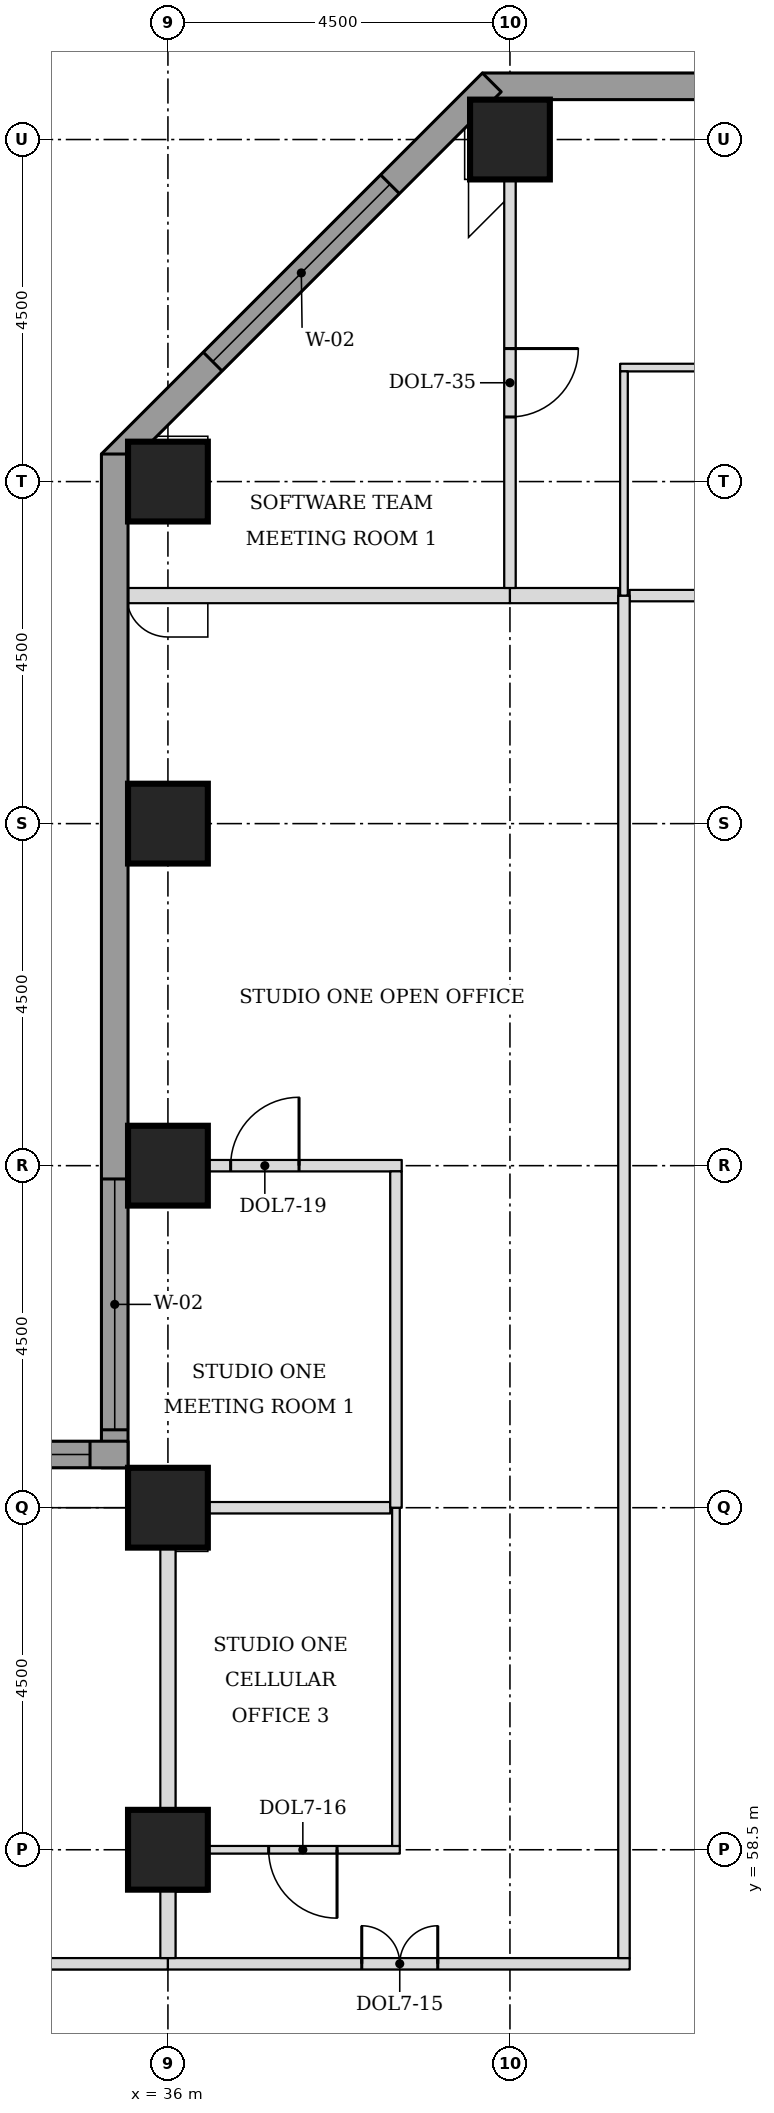
"""IFC4 building model, lengths in metres.
Left out: names, types, materials, properties, quantities, classifications, styles, units other than length and angle.
Written with IfcOpenShell. Run it as: python <this file> out.ifc"""

import sys

from ifc_helpers import new_model, si_unit, direction, frame, frame_2d, origin, origin_2d, place, context, subcontext, project, spatial, rectangle, extrude, element, fill, save


model = new_model("IFC4")
c1 = context("Model", 3, precision=1e-05, world=origin(), true_north=direction((0.0, 1.0)))
c2 = subcontext(c1, "Body", "Model", "MODEL_VIEW")
j1 = project(units=[si_unit("LENGTHUNIT", "METRE"), si_unit("PLANEANGLEUNIT", "RADIAN")], contexts=[c1])
p1 = place(None, origin())
s1 = spatial("IfcSite", under=j1, at=p1, CompositionType="ELEMENT")
p2 = place(p1, origin())
s2 = spatial("IfcBuilding", under=s1, at=p2, CompositionType="ELEMENT")
p3 = place(p2, frame((0.0, 0.0, 130.7)))
s3 = spatial("IfcBuildingStorey", under=s2, at=p3, CompositionType="ELEMENT", Elevation=130.7)
for number, where, z_axis, x_axis in (
    (1, (36.0, 58.5, 0.0), (0.0, 0.0, 1.0), (1.0, 0.0, 0.0)),
    (2, (36.0, 63.0, 0.0), (0.0, 0.0, 1.0), (1.0, 0.0, 0.0)),
    (3, (36.0, 67.5, 0.0), (0.0, 0.0, 1.0), (1.0, 0.0, 0.0)),
    (4, (36.0, 72.0, 0.0), (0.0, 0.0, 1.0), (1.0, 0.0, 0.0)),
    (5, (36.0, 76.5, 0.0), (0.0, 0.0, 1.0), (1.0, 0.0, 0.0)),
    (6, (40.5, 81.0, 0.0), (0.0, 0.0, 1.0), (1.0, 0.0, 0.0)),
):
    element("IfcColumn", number, at=place(p3, frame(where, z_axis=z_axis, x_axis=x_axis)), inside=s3, PredefinedType="COLUMN", context=c2, shape_type="SweptSolid", body=[
        extrude(rectangle(XDim=1.05, YDim=1.05, at=origin_2d()), origin(), (0.0, 0.0, 1.0), 3.7),
    ])
p4 = place(p3, frame((72.362, 81.7, 0.0), z_axis=(0.0, 0.0, 1.0), x_axis=(-1.0, 0.0, 0.0)))
e7 = element("IfcWall", 7, at=p4, inside=s3, PredefinedType="STANDARD", context=c2, shape_type="SweptSolid", body=[
    extrude(rectangle(XDim=32.225, YDim=0.35, at=frame_2d((16.112, 0.0))), origin(), (0.0, 0.0, 1.0), 3.525),
])
p5 = place(p4, frame((5.462, 0.0, 0.9)))
e8 = element("IfcOpeningElement", 8, at=p5, cuts=e7, PredefinedType="OPENING", context=c2, shape_type="SweptSolid", body=[
    extrude(rectangle(XDim=3.3, YDim=1.9, at=frame_2d((1.65, 0.95))), frame((0.0, 0.185, 0.0), z_axis=(0.0, -1.0, 0.0), x_axis=(1.0, 0.0, 0.0)), (0.0, 0.0, 1.0), 0.37),
])
p6 = place(p4, frame((9.962, 0.0, 0.9)))
e9 = element("IfcOpeningElement", 9, at=p6, cuts=e7, PredefinedType="OPENING", context=c2, shape_type="SweptSolid", body=[
    extrude(rectangle(XDim=3.3, YDim=1.9, at=frame_2d((1.65, 0.95))), frame((0.0, 0.185, 0.0), z_axis=(0.0, -1.0, 0.0), x_axis=(1.0, 0.0, 0.0)), (0.0, 0.0, 1.0), 0.37),
])
p7 = place(p4, frame((14.462, 0.0, 0.9)))
e10 = element("IfcOpeningElement", 10, at=p7, cuts=e7, PredefinedType="OPENING", context=c2, shape_type="SweptSolid", body=[
    extrude(rectangle(XDim=3.3, YDim=1.9, at=frame_2d((1.65, 0.95))), frame((0.0, 0.185, 0.0), z_axis=(0.0, -1.0, 0.0), x_axis=(1.0, 0.0, 0.0)), (0.0, 0.0, 1.0), 0.37),
])
p8 = place(p4, frame((18.962, 0.0, 0.9)))
e11 = element("IfcOpeningElement", 11, at=p8, cuts=e7, PredefinedType="OPENING", context=c2, shape_type="SweptSolid", body=[
    extrude(rectangle(XDim=3.3, YDim=1.9, at=frame_2d((1.65, 0.95))), frame((0.0, 0.185, 0.0), z_axis=(0.0, -1.0, 0.0), x_axis=(1.0, 0.0, 0.0)), (0.0, 0.0, 1.0), 0.37),
])
p9 = place(p4, frame((23.462, 0.0, 0.9)))
e12 = element("IfcOpeningElement", 12, at=p9, cuts=e7, PredefinedType="OPENING", context=c2, shape_type="SweptSolid", body=[
    extrude(rectangle(XDim=3.3, YDim=1.9, at=frame_2d((1.65, 0.95))), frame((0.0, 0.185, 0.0), z_axis=(0.0, -1.0, 0.0), x_axis=(1.0, 0.0, 0.0)), (0.0, 0.0, 1.0), 0.37),
])
p10 = place(p3, frame((40.261, 81.751, 0.0), z_axis=(0.0, 0.0, 1.0), x_axis=(-0.707106781187, -0.707106781187, 0.0)))
e13 = element("IfcWall", 13, at=p10, inside=s3, PredefinedType="STANDARD", context=c2, shape_type="SweptSolid", body=[
    extrude(rectangle(XDim=7.089, YDim=0.35, at=frame_2d((3.544, 0.0))), origin(), (0.0, 0.0, 1.0), 3.525),
])
p11 = place(p10, frame((1.894, 0.0, 0.9)))
e14 = element("IfcOpeningElement", 14, at=p11, cuts=e13, PredefinedType="OPENING", context=c2, shape_type="SweptSolid", body=[
    extrude(rectangle(XDim=3.3, YDim=1.9, at=frame_2d((1.65, 0.95))), frame((0.0, 0.185, 0.0), z_axis=(0.0, -1.0, 0.0), x_axis=(1.0, 0.0, 0.0)), (0.0, 0.0, 1.0), 0.37),
])
p12 = place(p3, frame((35.3, 76.862, 0.0), z_axis=(0.0, 0.0, 1.0), x_axis=(0.0, -1.0, 0.0)))
e15 = element("IfcWall", 15, at=p12, inside=s3, PredefinedType="STANDARD", context=c2, shape_type="SweptSolid", body=[
    extrude(rectangle(XDim=13.337, YDim=0.35, at=frame_2d((6.669, 0.0))), origin(), (0.0, 0.0, 1.0), 3.525),
])
p13 = place(p12, frame((9.537, 0.0, 0.9)))
e16 = element("IfcOpeningElement", 16, at=p13, cuts=e15, PredefinedType="OPENING", context=c2, shape_type="SweptSolid", body=[
    extrude(rectangle(XDim=3.3, YDim=1.9, at=frame_2d((1.65, 0.95))), frame((0.0, 0.185, 0.0), z_axis=(0.0, -1.0, 0.0), x_axis=(1.0, 0.0, 0.0)), (0.0, 0.0, 1.0), 0.37),
])
p14 = place(p3, frame((35.475, 63.7, 0.0), z_axis=(0.0, 0.0, 1.0), x_axis=(-1.0, 0.0, 0.0)))
e17 = element("IfcWall", 17, at=p14, inside=s3, PredefinedType="STANDARD", context=c2, shape_type="SweptSolid", body=[
    extrude(rectangle(XDim=17.837, YDim=0.35, at=frame_2d((8.919, 0.0))), origin(), (0.0, 0.0, 1.0), 3.525),
])
p15 = place(p14, frame((0.5, 0.0, 0.9)))
e18 = element("IfcOpeningElement", 18, at=p15, cuts=e17, PredefinedType="OPENING", context=c2, shape_type="SweptSolid", body=[
    extrude(rectangle(XDim=3.3, YDim=1.9, at=frame_2d((1.65, 0.95))), frame((0.0, 0.185, 0.0), z_axis=(0.0, -1.0, 0.0), x_axis=(1.0, 0.0, 0.0)), (0.0, 0.0, 1.0), 0.37),
])
p16 = place(p14, frame((9.075, 0.0, 0.9)))
e19 = element("IfcOpeningElement", 19, at=p16, cuts=e17, PredefinedType="OPENING", context=c2, shape_type="SweptSolid", body=[
    extrude(rectangle(XDim=3.3, YDim=1.9, at=frame_2d((1.65, 0.95))), frame((0.0, 0.185, 0.0), z_axis=(0.0, -1.0, 0.0), x_axis=(1.0, 0.0, 0.0)), (0.0, 0.0, 1.0), 0.37),
])
p17 = place(p3, frame((29.38, 57.0, 0.0), z_axis=(0.0, 0.0, 1.0), x_axis=(1.0, 0.0, 0.0)))
e20 = element("IfcWall", 20, at=p17, inside=s3, PredefinedType="PARTITIONING", context=c2, shape_type="SweptSolid", body=[
    extrude(rectangle(XDim=6.62, YDim=0.15, at=frame_2d((3.31, 0.0))), origin(), (0.0, 0.0, 1.0), 3.55),
])
p18 = place(p17, frame((2.88, 0.0, 0.0)))
e21 = element("IfcOpeningElement", 21, at=p18, cuts=e20, PredefinedType="OPENING", context=c2, shape_type="SweptSolid", body=[
    extrude(rectangle(XDim=1.0, YDim=2.1, at=frame_2d((0.5, 1.05))), frame((0.0, 0.085, 0.0), z_axis=(0.0, -1.0, 0.0), x_axis=(1.0, 0.0, 0.0)), (0.0, 0.0, 1.0), 0.17),
])
p19 = place(p3, frame((36.0, 57.0, 0.0), z_axis=(0.0, 0.0, 1.0), x_axis=(1.0, 0.0, 0.0)))
e22 = element("IfcWall", 22, at=p19, inside=s3, PredefinedType="PARTITIONING", context=c2, shape_type="SweptSolid", body=[
    extrude(rectangle(XDim=6.075, YDim=0.15, at=frame_2d((3.038, 0.0))), origin(), (0.0, 0.0, 1.0), 3.55),
])
p20 = place(p19, frame((2.55, 0.0, 0.0)))
e23 = element("IfcOpeningElement", 23, at=p20, cuts=e22, PredefinedType="OPENING", context=c2, shape_type="SweptSolid", body=[
    extrude(rectangle(XDim=1.0, YDim=2.1, at=frame_2d((0.5, 1.05))), frame((0.0, 0.085, 0.0), z_axis=(0.0, -1.0, 0.0), x_axis=(1.0, 0.0, 0.0)), (0.0, 0.0, 1.0), 0.17),
])
p21 = place(p3, frame((36.525, 58.5, 0.0), z_axis=(0.0, 0.0, 1.0), x_axis=(1.0, 0.0, 0.0)))
e24 = element("IfcWall", 24, at=p21, inside=s3, PredefinedType="PARTITIONING", context=c2, shape_type="SweptSolid", body=[
    extrude(rectangle(XDim=2.525, YDim=0.1, at=frame_2d((1.263, 0.0))), origin(), (0.0, 0.0, 1.0), 3.55),
])
p22 = place(p21, frame((0.8, 0.0, 0.0)))
e25 = element("IfcOpeningElement", 25, at=p22, cuts=e24, PredefinedType="OPENING", context=c2, shape_type="SweptSolid", body=[
    extrude(rectangle(XDim=0.9, YDim=2.1, at=frame_2d((0.45, 1.05))), frame((0.0, 0.06, 0.0), z_axis=(0.0, -1.0, 0.0), x_axis=(1.0, 0.0, 0.0)), (0.0, 0.0, 1.0), 0.12),
])
p23 = place(p3, frame((36.525, 63.0, 0.0), z_axis=(0.0, 0.0, 1.0), x_axis=(1.0, 0.0, 0.0)))
e26 = element("IfcWall", 26, at=p23, inside=s3, PredefinedType="PARTITIONING", context=c2, shape_type="SweptSolid", body=[
    extrude(rectangle(XDim=2.4, YDim=0.15, at=frame_2d((1.2, 0.0))), origin(), (0.0, 0.0, 1.0), 3.55),
])
p24 = place(p3, frame((35.475, 67.5, 0.0), z_axis=(0.0, 0.0, 1.0), x_axis=(1.0, 0.0, 0.0)))
e27 = element("IfcWall", 27, at=p24, inside=s3, PredefinedType="PARTITIONING", context=c2, shape_type="SweptSolid", body=[
    extrude(rectangle(XDim=3.6, YDim=0.15, at=frame_2d((1.8, 0.0))), origin(), (0.0, 0.0, 1.0), 3.55),
])
p25 = place(p24, frame((1.35, 0.0, 0.0)))
e28 = element("IfcOpeningElement", 28, at=p25, cuts=e27, PredefinedType="OPENING", context=c2, shape_type="SweptSolid", body=[
    extrude(rectangle(XDim=0.9, YDim=2.1, at=frame_2d((0.45, 1.05))), frame((0.0, 0.085, 0.0), z_axis=(0.0, -1.0, 0.0), x_axis=(1.0, 0.0, 0.0)), (0.0, 0.0, 1.0), 0.17),
])
p26 = place(p3, frame((35.475, 75.0, 0.0), z_axis=(0.0, 0.0, 1.0), x_axis=(1.0, 0.0, 0.0)))
e29 = element("IfcWall", 29, at=p26, inside=s3, PredefinedType="PARTITIONING", context=c2, shape_type="SweptSolid", body=[
    extrude(rectangle(XDim=5.025, YDim=0.2, at=frame_2d((2.512, 0.0))), origin(), (0.0, 0.0, 1.0), 3.55),
])
p27 = place(p3, frame((40.5, 75.0, 0.0), z_axis=(0.0, 0.0, 1.0), x_axis=(1.0, 0.0, 0.0)))
e30 = element("IfcWall", 30, at=p27, inside=s3, PredefinedType="PARTITIONING", context=c2, shape_type="SweptSolid", body=[
    extrude(rectangle(XDim=1.425, YDim=0.2, at=frame_2d((0.712, 0.0))), origin(), (0.0, 0.0, 1.0), 3.55),
])
p28 = place(p3, frame((42.075, 75.0, 0.0), z_axis=(0.0, 0.0, 1.0), x_axis=(1.0, 0.0, 0.0)))
e31 = element("IfcWall", 31, at=p28, inside=s3, PredefinedType="PARTITIONING", context=c2, shape_type="SweptSolid", body=[
    extrude(rectangle(XDim=4.425, YDim=0.15, at=frame_2d((2.212, 0.0))), origin(), (0.0, 0.0, 1.0), 3.55),
])
p29 = place(p28, frame((1.7, 0.0, 0.0)))
e32 = element("IfcOpeningElement", 32, at=p29, cuts=e31, PredefinedType="OPENING", context=c2, shape_type="SweptSolid", body=[
    extrude(rectangle(XDim=1.0, YDim=2.1, at=frame_2d((0.5, 1.05))), frame((0.0, 0.085, 0.0), z_axis=(0.0, -1.0, 0.0), x_axis=(1.0, 0.0, 0.0)), (0.0, 0.0, 1.0), 0.17),
])
p30 = place(p3, frame((41.95, 78.0, 0.0), z_axis=(0.0, 0.0, 1.0), x_axis=(1.0, 0.0, 0.0)))
e33 = element("IfcWall", 33, at=p30, inside=s3, PredefinedType="PARTITIONING", context=c2, shape_type="SweptSolid", body=[
    extrude(rectangle(XDim=4.6, YDim=0.1, at=frame_2d((2.3, 0.0))), origin(), (0.0, 0.0, 1.0), 3.55),
])
p31 = place(p30, frame((1.85, 0.0, 0.0)))
e34 = element("IfcOpeningElement", 34, at=p31, cuts=e33, PredefinedType="OPENING", context=c2, shape_type="SweptSolid", body=[
    extrude(rectangle(XDim=0.9, YDim=2.1, at=frame_2d((0.45, 1.05))), frame((0.0, 0.06, 0.0), z_axis=(0.0, -1.0, 0.0), x_axis=(1.0, 0.0, 0.0)), (0.0, 0.0, 1.0), 0.12),
])
p32 = place(p3, frame((36.0, 57.075, 0.0), z_axis=(0.0, 0.0, 1.0), x_axis=(0.0, 1.0, 0.0)))
e35 = element("IfcWall", 35, at=p32, inside=s3, PredefinedType="PARTITIONING", context=c2, shape_type="SweptSolid", body=[
    extrude(rectangle(XDim=0.9, YDim=0.2, at=frame_2d((0.45, 0.0))), origin(), (0.0, 0.0, 1.0), 2.8),
])
p33 = place(p3, frame((42.0, 57.075, 0.0), z_axis=(0.0, 0.0, 1.0), x_axis=(0.0, 1.0, 0.0)))
e36 = element("IfcWall", 36, at=p33, inside=s3, PredefinedType="PARTITIONING", context=c2, shape_type="SweptSolid", body=[
    extrude(rectangle(XDim=17.925, YDim=0.15, at=frame_2d((8.962, 0.0))), origin(), (0.0, 0.0, 1.0), 3.55),
])
p34 = place(p3, frame((39.0, 58.55, 0.0), z_axis=(0.0, 0.0, 1.0), x_axis=(0.0, 1.0, 0.0)))
e37 = element("IfcWall", 37, at=p34, inside=s3, PredefinedType="PARTITIONING", context=c2, shape_type="SweptSolid", body=[
    extrude(rectangle(XDim=4.45, YDim=0.1, at=frame_2d((2.225, 0.0))), origin(), (0.0, 0.0, 1.0), 3.55),
])
p35 = place(p3, frame((36.0, 58.995, 0.0), z_axis=(0.0, 0.0, 1.0), x_axis=(0.0, 1.0, 0.0)))
e38 = element("IfcWall", 38, at=p35, inside=s3, PredefinedType="PARTITIONING", context=c2, shape_type="SweptSolid", body=[
    extrude(rectangle(XDim=3.48, YDim=0.2, at=frame_2d((1.74, 0.0))), origin(), (0.0, 0.0, 1.0), 2.8),
])
p36 = place(p3, frame((39.0, 63.0, 0.0), z_axis=(0.0, 0.0, 1.0), x_axis=(0.0, 1.0, 0.0)))
e39 = element("IfcWall", 39, at=p36, inside=s3, PredefinedType="PARTITIONING", context=c2, shape_type="SweptSolid", body=[
    extrude(rectangle(XDim=4.425, YDim=0.15, at=frame_2d((2.212, 0.0))), origin(), (0.0, 0.0, 1.0), 3.55),
])
p37 = place(p3, frame((42.0, 75.0, 0.0), z_axis=(0.0, 0.0, 1.0), x_axis=(0.0, 1.0, 0.0)))
e40 = element("IfcWall", 40, at=p37, inside=s3, PredefinedType="PARTITIONING", context=c2, shape_type="SweptSolid", body=[
    extrude(rectangle(XDim=2.95, YDim=0.1, at=frame_2d((1.475, 0.0))), origin(), (0.0, 0.0, 1.0), 3.55),
])
p38 = place(p3, frame((40.5, 75.1, 0.0), z_axis=(0.0, 0.0, 1.0), x_axis=(0.0, 1.0, 0.0)))
e41 = element("IfcWall", 41, at=p38, inside=s3, PredefinedType="PARTITIONING", context=c2, shape_type="SweptSolid", body=[
    extrude(rectangle(XDim=5.375, YDim=0.15, at=frame_2d((2.688, 0.0))), origin(), (0.0, 0.0, 1.0), 3.55),
])
p39 = place(p38, frame((2.25, 0.0, 0.0)))
e42 = element("IfcOpeningElement", 42, at=p39, cuts=e41, PredefinedType="OPENING", context=c2, shape_type="SweptSolid", body=[
    extrude(rectangle(XDim=0.9, YDim=2.1, at=frame_2d((0.45, 1.05))), frame((0.0, 0.085, 0.0), z_axis=(0.0, -1.0, 0.0), x_axis=(1.0, 0.0, 0.0)), (0.0, 0.0, 1.0), 0.17),
])
p40 = place(p11, origin())
e43 = element("IfcWindow", 43, at=p40, inside=s3, PartitioningType="SINGLE_PANEL", PredefinedType="WINDOW", context=c2, shape_type="SweptSolid", body=[
    extrude(rectangle(XDim=3.3, YDim=1.9, at=frame_2d((1.65, 0.95))), frame((0.0, 0.085, 0.0), z_axis=(0.0, -1.0, 0.0), x_axis=(1.0, 0.0, 0.0)), (0.0, 0.0, 1.0), 0.06),
])
fill(e14, e43)
p41 = place(p13, origin())
e44 = element("IfcWindow", 44, at=p41, inside=s3, PartitioningType="SINGLE_PANEL", PredefinedType="WINDOW", context=c2, shape_type="SweptSolid", body=[
    extrude(rectangle(XDim=3.3, YDim=1.9, at=frame_2d((1.65, 0.95))), frame((0.0, 0.085, 0.0), z_axis=(0.0, -1.0, 0.0), x_axis=(1.0, 0.0, 0.0)), (0.0, 0.0, 1.0), 0.06),
])
fill(e16, e44)
p42 = place(p15, origin())
e45 = element("IfcWindow", 45, at=p42, inside=s3, PartitioningType="SINGLE_PANEL", PredefinedType="WINDOW", context=c2, shape_type="SweptSolid", body=[
    extrude(rectangle(XDim=3.3, YDim=1.9, at=frame_2d((1.65, 0.95))), frame((0.0, 0.085, 0.0), z_axis=(0.0, -1.0, 0.0), x_axis=(1.0, 0.0, 0.0)), (0.0, 0.0, 1.0), 0.06),
])
fill(e18, e45)
p43 = place(p39, frame((0.9, 0.0, 0.0), z_axis=(0.0, 0.0, 1.0), x_axis=(-1.0, 0.0, 0.0)))
e46 = element("IfcDoor", 46, at=p43, inside=s3, OperationType="SINGLE_SWING_LEFT", PredefinedType="DOOR", context=c2, shape_type="SweptSolid", body=[
    extrude(rectangle(XDim=0.9, YDim=2.1, at=frame_2d((0.45, 1.05))), frame((0.0, 0.025, 0.0), z_axis=(0.0, -1.0, 0.0), x_axis=(1.0, 0.0, 0.0)), (0.0, 0.0, 1.0), 0.05),
])
fill(e42, e46)
p44 = place(p20, origin())
e47 = element("IfcDoor", 47, at=p44, inside=s3, OperationType="DOUBLE_DOOR_SINGLE_SWING", PredefinedType="DOOR", context=c2, shape_type="SweptSolid", body=[
    extrude(rectangle(XDim=1.0, YDim=2.1, at=frame_2d((0.5, 1.05))), frame((0.0, 0.025, 0.0), z_axis=(0.0, -1.0, 0.0), x_axis=(1.0, 0.0, 0.0)), (0.0, 0.0, 1.0), 0.05),
])
fill(e23, e47)
p45 = place(p22, frame((0.9, 0.0, 0.0), z_axis=(0.0, 0.0, 1.0), x_axis=(-1.0, 0.0, 0.0)))
e48 = element("IfcDoor", 48, at=p45, inside=s3, OperationType="SINGLE_SWING_LEFT", PredefinedType="DOOR", context=c2, shape_type="SweptSolid", body=[
    extrude(rectangle(XDim=0.9, YDim=2.1, at=frame_2d((0.45, 1.05))), frame((0.0, 0.025, 0.0), z_axis=(0.0, -1.0, 0.0), x_axis=(1.0, 0.0, 0.0)), (0.0, 0.0, 1.0), 0.05),
])
fill(e25, e48)
p46 = place(p25, origin())
e49 = element("IfcDoor", 49, at=p46, inside=s3, OperationType="SINGLE_SWING_RIGHT", PredefinedType="DOOR", context=c2, shape_type="SweptSolid", body=[
    extrude(rectangle(XDim=0.9, YDim=2.1, at=frame_2d((0.45, 1.05))), frame((0.0, 0.025, 0.0), z_axis=(0.0, -1.0, 0.0), x_axis=(1.0, 0.0, 0.0)), (0.0, 0.0, 1.0), 0.05),
])
fill(e28, e49)
save(model, sys.argv[1])
